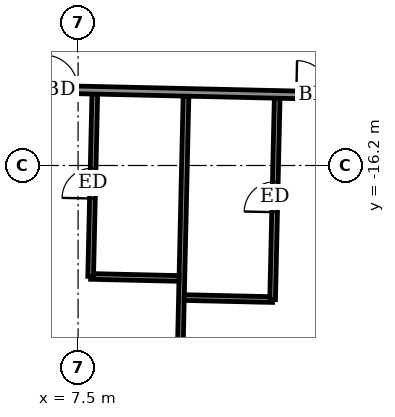
"""IFC4 building model, lengths in metres.
Left out: names, types, materials, properties, quantities, classifications, styles, units other than length and angle.
Written with IfcOpenShell. Run it as: python <this file> out.ifc"""

import sys

from ifc_helpers import new_model, si_unit, direction, frame, frame_2d, origin, place, context, subcontext, project, spatial, rectangle, extrude, element, fill, save


model = new_model("IFC4")
c1 = context("Model", 3, precision=1e-05, world=origin(), true_north=direction((0.0, 1.0)))
c2 = subcontext(c1, "Body", "Model", "MODEL_VIEW")
j1 = project(units=[si_unit("LENGTHUNIT", "METRE"), si_unit("PLANEANGLEUNIT", "RADIAN")], contexts=[c1])
p1 = place(None, origin())
s1 = spatial("IfcSite", under=j1, at=p1, CompositionType="ELEMENT")
p2 = place(p1, origin())
s2 = spatial("IfcBuilding", under=s1, at=p2, CompositionType="ELEMENT")
p3 = place(p2, frame((0.0, 0.0, 313.3)))
s3 = spatial("IfcBuildingStorey", under=s2, at=p3, CompositionType="ELEMENT", Elevation=313.3)
p4 = place(p3, frame((10.08, -25.822, 0.0), z_axis=(0.0, 0.0, 1.0), x_axis=(0.022708327922, 0.999742132674, 0.0)))
e1 = element("IfcWall", 1, at=p4, inside=s3, PredefinedType="PARTITIONING", context=c2, shape_type="SweptSolid", body=[
    extrude(rectangle(XDim=11.45, YDim=0.15, at=frame_2d((5.725, 0.0))), origin(), (0.0, 0.0, 1.0), 2.5),
])
p5 = place(p3, frame((10.294, -19.675, 0.0), z_axis=(0.0, 0.0, 1.0), x_axis=(0.999740478815, -0.022781023197, 0.0)))
e2 = element("IfcWall", 2, at=p5, inside=s3, PredefinedType="PARTITIONING", context=c2, shape_type="SweptSolid", body=[
    extrude(rectangle(XDim=2.325, YDim=0.15, at=frame_2d((1.163, 0.0))), origin(), (0.0, 0.0, 1.0), 3.05),
])
p6 = place(p3, frame((12.619, -19.728, 0.0), z_axis=(0.0, 0.0, 1.0), x_axis=(0.022661766832, 0.999743189186, 0.0)))
e3 = element("IfcWall", 3, at=p6, inside=s3, PredefinedType="PARTITIONING", context=c2, shape_type="SweptSolid", body=[
    extrude(rectangle(XDim=5.301, YDim=0.15, at=frame_2d((2.65, 0.0))), origin(), (0.0, 0.0, 1.0), 3.05),
])
p7 = place(p6, frame((2.3, 0.0, 0.0)))
e4 = element("IfcOpeningElement", 4, at=p7, cuts=e3, PredefinedType="OPENING", context=c2, shape_type="SweptSolid", body=[
    extrude(rectangle(XDim=0.8, YDim=2.1, at=frame_2d((0.4, 1.05))), frame((0.0, 0.085, 0.0), z_axis=(0.0, -1.0, 0.0), x_axis=(1.0, 0.0, 0.0)), (0.0, 0.0, 1.0), 0.17),
])
p8 = place(p3, frame((7.831, -19.119, 0.0), z_axis=(0.0, 0.0, 1.0), x_axis=(0.999738082346, -0.022885950011, 0.0)))
e5 = element("IfcWall", 5, at=p8, inside=s3, PredefinedType="PARTITIONING", context=c2, shape_type="SweptSolid", body=[
    extrude(rectangle(XDim=2.325, YDim=0.15, at=frame_2d((1.163, 0.0))), origin(), (0.0, 0.0, 1.0), 3.05),
])
p9 = place(p3, frame((7.831, -19.119, 0.0), z_axis=(0.0, 0.0, 1.0), x_axis=(0.022689048768, 0.999742570398, 0.0)))
e6 = element("IfcWall", 6, at=p9, inside=s3, PredefinedType="PARTITIONING", context=c2, shape_type="SweptSolid", body=[
    extrude(rectangle(XDim=4.799, YDim=0.15, at=frame_2d((2.399, 0.0))), origin(), (0.0, 0.0, 1.0), 3.05),
])
p10 = place(p9, frame((2.05, 0.0, 0.0)))
e7 = element("IfcOpeningElement", 7, at=p10, cuts=e6, PredefinedType="OPENING", context=c2, shape_type="SweptSolid", body=[
    extrude(rectangle(XDim=0.8, YDim=2.1, at=frame_2d((0.4, 1.05))), frame((0.0, 0.085, 0.0), z_axis=(0.0, -1.0, 0.0), x_axis=(1.0, 0.0, 0.0)), (0.0, 0.0, 1.0), 0.17),
])
p11 = place(p3, frame((-31.347, -13.329, 0.0), z_axis=(0.0, 0.0, 1.0), x_axis=(0.999742613079, -0.022687168058, 0.0)))
e8 = element("IfcWall", 8, at=p11, inside=s3, PredefinedType="PARTITIONING", context=c2, shape_type="SweptSolid", body=[
    extrude(rectangle(XDim=58.799, YDim=0.2, at=frame_2d((29.399, 0.0))), origin(), (0.0, 0.0, 1.0), 3.05),
])
p12 = place(p11, frame((1.35, 0.0, 0.0)))
e9 = element("IfcOpeningElement", 9, at=p12, cuts=e8, PredefinedType="OPENING", context=c2, shape_type="SweptSolid", body=[
    extrude(rectangle(XDim=1.0, YDim=2.1, at=frame_2d((0.5, 1.05))), frame((0.0, 0.11, 0.0), z_axis=(0.0, -1.0, 0.0), x_axis=(1.0, 0.0, 0.0)), (0.0, 0.0, 1.0), 0.22),
])
p13 = place(p11, frame((5.95, 0.0, 0.0)))
e10 = element("IfcOpeningElement", 10, at=p13, cuts=e8, PredefinedType="OPENING", context=c2, shape_type="SweptSolid", body=[
    extrude(rectangle(XDim=0.9, YDim=2.1, at=frame_2d((0.45, 1.05))), frame((0.0, 0.11, 0.0), z_axis=(0.0, -1.0, 0.0), x_axis=(1.0, 0.0, 0.0)), (0.0, 0.0, 1.0), 0.22),
])
p14 = place(p11, frame((10.575, 0.0, 0.0)))
e11 = element("IfcOpeningElement", 11, at=p14, cuts=e8, PredefinedType="OPENING", context=c2, shape_type="SweptSolid", body=[
    extrude(rectangle(XDim=0.9, YDim=2.1, at=frame_2d((0.45, 1.05))), frame((0.0, 0.11, 0.0), z_axis=(0.0, -1.0, 0.0), x_axis=(1.0, 0.0, 0.0)), (0.0, 0.0, 1.0), 0.22),
])
p15 = place(p11, frame((12.425, 0.0, 0.0)))
e12 = element("IfcOpeningElement", 12, at=p15, cuts=e8, PredefinedType="OPENING", context=c2, shape_type="SweptSolid", body=[
    extrude(rectangle(XDim=0.9, YDim=2.1, at=frame_2d((0.45, 1.05))), frame((0.0, 0.11, 0.0), z_axis=(0.0, -1.0, 0.0), x_axis=(1.0, 0.0, 0.0)), (0.0, 0.0, 1.0), 0.22),
])
p16 = place(p11, frame((19.075, 0.0, 0.0)))
e13 = element("IfcOpeningElement", 13, at=p16, cuts=e8, PredefinedType="OPENING", context=c2, shape_type="SweptSolid", body=[
    extrude(rectangle(XDim=0.9, YDim=2.1, at=frame_2d((0.45, 1.05))), frame((0.0, 0.11, 0.0), z_axis=(0.0, -1.0, 0.0), x_axis=(1.0, 0.0, 0.0)), (0.0, 0.0, 1.0), 0.22),
])
p17 = place(p11, frame((20.95, 0.0, 0.0)))
e14 = element("IfcOpeningElement", 14, at=p17, cuts=e8, PredefinedType="OPENING", context=c2, shape_type="SweptSolid", body=[
    extrude(rectangle(XDim=0.9, YDim=2.1, at=frame_2d((0.45, 1.05))), frame((0.0, 0.11, 0.0), z_axis=(0.0, -1.0, 0.0), x_axis=(1.0, 0.0, 0.0)), (0.0, 0.0, 1.0), 0.22),
])
p18 = place(p11, frame((27.625, 0.0, 0.0)))
e15 = element("IfcOpeningElement", 15, at=p18, cuts=e8, PredefinedType="OPENING", context=c2, shape_type="SweptSolid", body=[
    extrude(rectangle(XDim=0.9, YDim=2.1, at=frame_2d((0.45, 1.05))), frame((0.0, 0.11, 0.0), z_axis=(0.0, -1.0, 0.0), x_axis=(1.0, 0.0, 0.0)), (0.0, 0.0, 1.0), 0.22),
])
p19 = place(p11, frame((29.475, 0.0, 0.0)))
e16 = element("IfcOpeningElement", 16, at=p19, cuts=e8, PredefinedType="OPENING", context=c2, shape_type="SweptSolid", body=[
    extrude(rectangle(XDim=0.9, YDim=2.1, at=frame_2d((0.45, 1.05))), frame((0.0, 0.11, 0.0), z_axis=(0.0, -1.0, 0.0), x_axis=(1.0, 0.0, 0.0)), (0.0, 0.0, 1.0), 0.22),
])
p20 = place(p11, frame((36.125, 0.0, 0.0)))
e17 = element("IfcOpeningElement", 17, at=p20, cuts=e8, PredefinedType="OPENING", context=c2, shape_type="SweptSolid", body=[
    extrude(rectangle(XDim=0.9, YDim=2.1, at=frame_2d((0.45, 1.05))), frame((0.0, 0.11, 0.0), z_axis=(0.0, -1.0, 0.0), x_axis=(1.0, 0.0, 0.0)), (0.0, 0.0, 1.0), 0.22),
])
p21 = place(p11, frame((37.95, 0.0, 0.0)))
e18 = element("IfcOpeningElement", 18, at=p21, cuts=e8, PredefinedType="OPENING", context=c2, shape_type="SweptSolid", body=[
    extrude(rectangle(XDim=0.9, YDim=2.1, at=frame_2d((0.45, 1.05))), frame((0.0, 0.11, 0.0), z_axis=(0.0, -1.0, 0.0), x_axis=(1.0, 0.0, 0.0)), (0.0, 0.0, 1.0), 0.22),
])
p22 = place(p11, frame((44.6, 0.0, 0.0)))
e19 = element("IfcOpeningElement", 19, at=p22, cuts=e8, PredefinedType="OPENING", context=c2, shape_type="SweptSolid", body=[
    extrude(rectangle(XDim=0.9, YDim=2.1, at=frame_2d((0.45, 1.05))), frame((0.0, 0.11, 0.0), z_axis=(0.0, -1.0, 0.0), x_axis=(1.0, 0.0, 0.0)), (0.0, 0.0, 1.0), 0.22),
])
p23 = place(p11, frame((46.475, 0.0, 0.0)))
e20 = element("IfcOpeningElement", 20, at=p23, cuts=e8, PredefinedType="OPENING", context=c2, shape_type="SweptSolid", body=[
    extrude(rectangle(XDim=0.9, YDim=2.1, at=frame_2d((0.45, 1.05))), frame((0.0, 0.11, 0.0), z_axis=(0.0, -1.0, 0.0), x_axis=(1.0, 0.0, 0.0)), (0.0, 0.0, 1.0), 0.22),
])
p24 = place(p11, frame((55.925, 0.0, 0.0)))
e21 = element("IfcOpeningElement", 21, at=p24, cuts=e8, PredefinedType="OPENING", context=c2, shape_type="SweptSolid", body=[
    extrude(rectangle(XDim=1.0, YDim=2.1, at=frame_2d((0.5, 1.05))), frame((0.0, 0.11, 0.0), z_axis=(0.0, -1.0, 0.0), x_axis=(1.0, 0.0, 0.0)), (0.0, 0.0, 1.0), 0.22),
])
p25 = place(p11, frame((51.0, 0.0, 0.0)))
e22 = element("IfcOpeningElement", 22, at=p25, cuts=e8, PredefinedType="OPENING", context=c2, shape_type="SweptSolid", body=[
    extrude(rectangle(XDim=0.9, YDim=2.1, at=frame_2d((0.45, 1.05))), frame((0.0, 0.11, 0.0), z_axis=(0.0, -1.0, 0.0), x_axis=(1.0, 0.0, 0.0)), (0.0, 0.0, 1.0), 0.22),
])
p26 = place(p21, origin())
e23 = element("IfcDoor", 23, at=p26, inside=s3, OperationType="SINGLE_SWING_RIGHT", PredefinedType="DOOR", context=c2, shape_type="SweptSolid", body=[
    extrude(rectangle(XDim=0.9, YDim=2.1, at=frame_2d((0.45, 1.05))), frame((0.0, 0.025, 0.0), z_axis=(0.0, -1.0, 0.0), x_axis=(1.0, 0.0, 0.0)), (0.0, 0.0, 1.0), 0.05),
])
fill(e18, e23)
p27 = place(p10, origin())
e24 = element("IfcDoor", 24, at=p27, inside=s3, OperationType="SINGLE_SWING_RIGHT", PredefinedType="DOOR", context=c2, shape_type="SweptSolid", body=[
    extrude(rectangle(XDim=0.8, YDim=2.1, at=frame_2d((0.4, 1.05))), frame((0.0, 0.025, 0.0), z_axis=(0.0, -1.0, 0.0), x_axis=(1.0, 0.0, 0.0)), (0.0, 0.0, 1.0), 0.05),
])
fill(e7, e24)
p28 = place(p22, origin())
e25 = element("IfcDoor", 25, at=p28, inside=s3, OperationType="SINGLE_SWING_LEFT", PredefinedType="DOOR", context=c2, shape_type="SweptSolid", body=[
    extrude(rectangle(XDim=0.9, YDim=2.1, at=frame_2d((0.45, 1.05))), frame((0.0, 0.025, 0.0), z_axis=(0.0, -1.0, 0.0), x_axis=(1.0, 0.0, 0.0)), (0.0, 0.0, 1.0), 0.05),
])
fill(e19, e25)
p29 = place(p7, origin())
e26 = element("IfcDoor", 26, at=p29, inside=s3, OperationType="SINGLE_SWING_LEFT", PredefinedType="DOOR", context=c2, shape_type="SweptSolid", body=[
    extrude(rectangle(XDim=0.8, YDim=2.1, at=frame_2d((0.4, 1.05))), frame((0.0, 0.025, 0.0), z_axis=(0.0, -1.0, 0.0), x_axis=(1.0, 0.0, 0.0)), (0.0, 0.0, 1.0), 0.05),
])
fill(e4, e26)
save(model, sys.argv[1])
